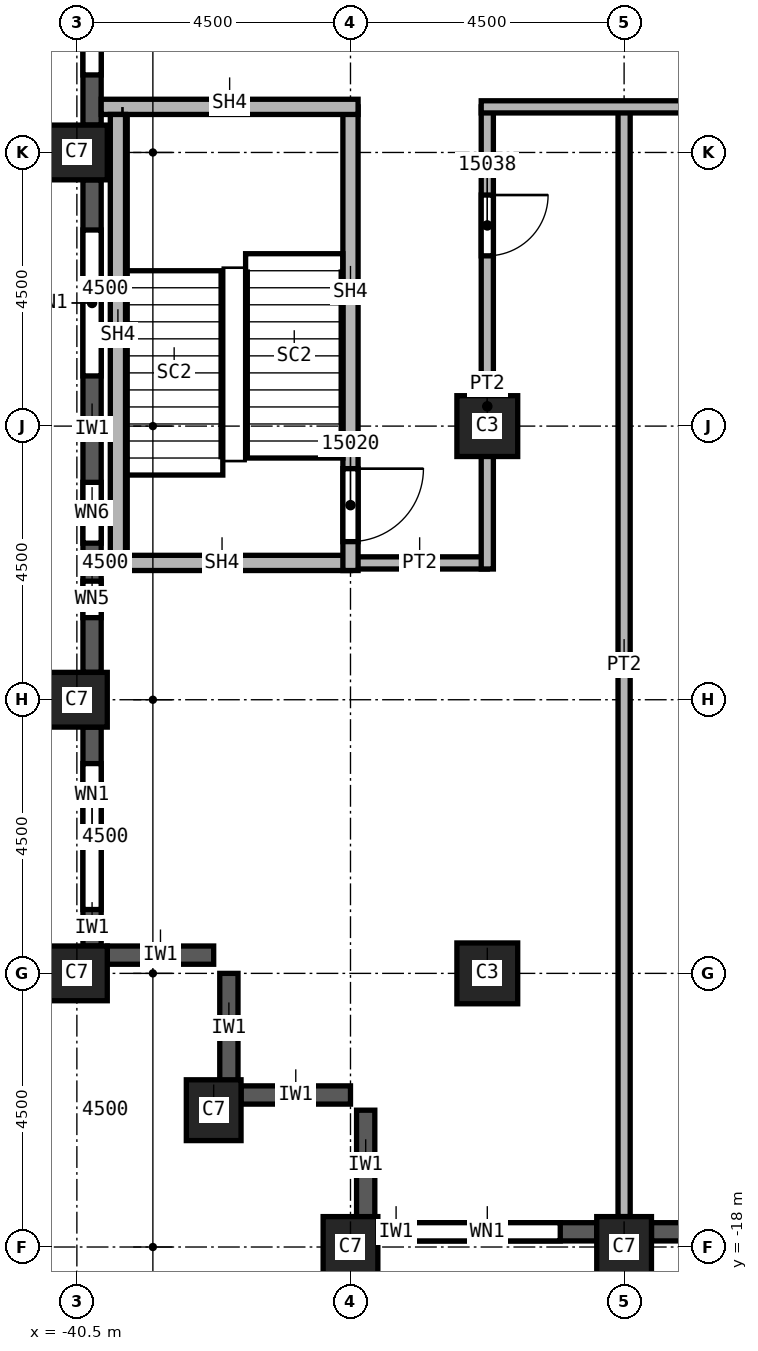
"""IFC4 building model, lengths in metres.
Left out: names, types, materials, properties, quantities, classifications, styles, units other than length and angle.
Written with IfcOpenShell. Run it as: python <this file> out.ifc"""

import sys

from ifc_helpers import new_model, si_unit, direction, frame, frame_2d, origin, origin_2d, place, context, subcontext, project, spatial, rectangle, extrude, element, fill, save


model = new_model("IFC4")
c1 = context("Model", 3, precision=1e-05, world=origin(), true_north=direction((0.0, 1.0)))
c2 = subcontext(c1, "Body", "Model", "MODEL_VIEW")
j1 = project(units=[si_unit("LENGTHUNIT", "METRE"), si_unit("PLANEANGLEUNIT", "RADIAN")], contexts=[c1])
p1 = place(None, origin())
s1 = spatial("IfcSite", under=j1, at=p1, CompositionType="ELEMENT")
p2 = place(p1, origin())
s2 = spatial("IfcBuilding", under=s1, at=p2, CompositionType="ELEMENT")
p3 = place(p2, frame((0.0, 0.0, 228.0)))
s3 = spatial("IfcBuildingStorey", under=s2, at=p3, CompositionType="ELEMENT", Elevation=228.0)
for number, where, z_axis, x_axis in (
    (1, (-40.5, 0.0, 0.0), (0.0, 0.0, 1.0), (0.0, 1.0, 0.0)),
    (2, (-40.5, -9.0, 0.0), (0.0, 0.0, 1.0), (0.0, 1.0, 0.0)),
    (3, (-40.5, -13.5, 0.0), (0.0, 0.0, 1.0), (0.0, 1.0, 0.0)),
    (4, (-38.25, -15.75, 0.0), (0.0, 0.0, 1.0), (1.0, 0.0, 0.0)),
    (5, (-31.5, -18.0, 0.0), (0.0, 0.0, 1.0), (1.0, 0.0, 0.0)),
    (6, (-36.0, -18.0, 0.0), (0.0, 0.0, 1.0), (1.0, 0.0, 0.0)),
):
    element("IfcColumn", number, at=place(p3, frame(where, z_axis=z_axis, x_axis=x_axis)), inside=s3, PredefinedType="COLUMN", context=c2, shape_type="SweptSolid", body=[
        extrude(rectangle(XDim=0.9, YDim=1.0, at=origin_2d()), origin(), (0.0, 0.0, 1.0), 3.72),
    ])
for number, where, z_axis, x_axis in (
    (7, (-33.75, -4.5, 0.0), (0.0, 0.0, 1.0), (1.0, 0.0, 0.0)),
    (8, (-33.75, -13.5, 0.0), (0.0, 0.0, 1.0), (1.0, 0.0, 0.0)),
):
    element("IfcColumn", number, at=place(p3, frame(where, z_axis=z_axis, x_axis=x_axis)), inside=s3, PredefinedType="COLUMN", context=c2, shape_type="SweptSolid", body=[
        extrude(rectangle(XDim=1.0, YDim=1.0, at=origin_2d()), origin(), (0.0, 0.0, 1.0), 3.72),
    ])
p4 = place(p3, frame((-40.0, -13.2, 0.0), z_axis=(0.0, 0.0, 1.0), x_axis=(1.0, 0.0, 0.0)))
e9 = element("IfcWall", 9, at=p4, inside=s3, PredefinedType="SOLIDWALL", context=c2, shape_type="SweptSolid", body=[
    extrude(rectangle(XDim=1.75, YDim=0.3, at=frame_2d((0.875, 0.0))), origin(), (0.0, 0.0, 1.0), 3.12),
])
for number, where, z_axis, x_axis in (
    (10, (-38.0, -15.3, 0.0), (0.0, 0.0, 1.0), (0.0, 1.0, 0.0)),
    (11, (-37.8, -15.5, 0.0), (0.0, 0.0, 1.0), (1.0, 0.0, 0.0)),
    (12, (-35.75, -17.55, 0.0), (0.0, 0.0, 1.0), (0.0, 1.0, 0.0)),
):
    element("IfcWall", number, at=place(p3, frame(where, z_axis=z_axis, x_axis=x_axis)), inside=s3, PredefinedType="SOLIDWALL", context=c2, shape_type="SweptSolid", body=[
        extrude(rectangle(XDim=1.8, YDim=0.3, at=frame_2d((0.9, 0.0))), origin(), (0.0, 0.0, 1.0), 3.12),
    ])
p5 = place(p3, frame((-40.25, 8.55, 0.0), z_axis=(0.0, 0.0, 1.0), x_axis=(0.0, -1.0, 0.0)))
e13 = element("IfcWall", 13, at=p5, inside=s3, PredefinedType="SOLIDWALL", context=c2, shape_type="SweptSolid", body=[
    extrude(rectangle(XDim=8.1, YDim=0.3, at=frame_2d((4.05, 0.0))), origin(), (0.0, 0.0, 1.0), 3.12),
])
p6 = place(p5, frame((0.825, 0.0, 0.8)))
e14 = element("IfcOpeningElement", 14, at=p6, cuts=e13, PredefinedType="OPENING", context=c2, shape_type="SweptSolid", body=[
    extrude(rectangle(XDim=2.4, YDim=1.95, at=frame_2d((1.2, 0.975))), frame((0.0, 0.15, 0.0), z_axis=(0.0, -1.0, 0.0), x_axis=(1.0, 0.0, 0.0)), (0.0, 0.0, 1.0), 0.3),
])
p7 = place(p5, frame((4.875, 0.0, 0.8)))
e15 = element("IfcOpeningElement", 15, at=p7, cuts=e13, PredefinedType="OPENING", context=c2, shape_type="SweptSolid", body=[
    extrude(rectangle(XDim=2.4, YDim=1.95, at=frame_2d((1.2, 0.975))), frame((0.0, 0.15, 0.0), z_axis=(0.0, -1.0, 0.0), x_axis=(1.0, 0.0, 0.0)), (0.0, 0.0, 1.0), 0.3),
])
p8 = place(p3, frame((-40.25, -0.45, 0.0), z_axis=(0.0, 0.0, 1.0), x_axis=(0.0, -1.0, 0.0)))
e16 = element("IfcWall", 16, at=p8, inside=s3, PredefinedType="SOLIDWALL", context=c2, shape_type="SweptSolid", body=[
    extrude(rectangle(XDim=8.1, YDim=0.3, at=frame_2d((4.05, 0.0))), origin(), (0.0, 0.0, 1.0), 3.12),
])
p9 = place(p8, frame((0.825, 0.0, 0.8)))
e17 = element("IfcOpeningElement", 17, at=p9, cuts=e16, PredefinedType="OPENING", context=c2, shape_type="SweptSolid", body=[
    extrude(rectangle(XDim=2.4, YDim=1.95, at=frame_2d((1.2, 0.975))), frame((0.0, 0.15, 0.0), z_axis=(0.0, -1.0, 0.0), x_axis=(1.0, 0.0, 0.0)), (0.0, 0.0, 1.0), 0.3),
])
p10 = place(p8, frame((4.975, 0.0, 0.8)))
e18 = element("IfcOpeningElement", 18, at=p10, cuts=e16, PredefinedType="OPENING", context=c2, shape_type="SweptSolid", body=[
    extrude(rectangle(XDim=1.0, YDim=1.95, at=frame_2d((0.5, 0.975))), frame((0.0, 0.15, 0.0), z_axis=(0.0, -1.0, 0.0), x_axis=(1.0, 0.0, 0.0)), (0.0, 0.0, 1.0), 0.3),
])
p11 = place(p8, frame((6.6, 0.0, 0.8)))
e19 = element("IfcOpeningElement", 19, at=p11, cuts=e16, PredefinedType="OPENING", context=c2, shape_type="SweptSolid", body=[
    extrude(rectangle(XDim=0.6, YDim=1.95, at=frame_2d((0.3, 0.975))), frame((0.0, 0.15, 0.0), z_axis=(0.0, -1.0, 0.0), x_axis=(1.0, 0.0, 0.0)), (0.0, 0.0, 1.0), 0.3),
])
p12 = place(p3, frame((-40.25, -9.45, 0.0), z_axis=(0.0, 0.0, 1.0), x_axis=(0.0, -1.0, 0.0)))
e20 = element("IfcWall", 20, at=p12, inside=s3, PredefinedType="SOLIDWALL", context=c2, shape_type="SweptSolid", body=[
    extrude(rectangle(XDim=3.6, YDim=0.3, at=frame_2d((1.8, 0.0))), origin(), (0.0, 0.0, 1.0), 3.12),
])
p13 = place(p12, frame((0.6, 0.0, 0.8)))
e21 = element("IfcOpeningElement", 21, at=p13, cuts=e20, PredefinedType="OPENING", context=c2, shape_type="SweptSolid", body=[
    extrude(rectangle(XDim=2.4, YDim=1.95, at=frame_2d((1.2, 0.975))), frame((0.0, 0.15, 0.0), z_axis=(0.0, -1.0, 0.0), x_axis=(1.0, 0.0, 0.0)), (0.0, 0.0, 1.0), 0.3),
])
p14 = place(p3, frame((-35.55, -17.75, 0.0), z_axis=(0.0, 0.0, 1.0), x_axis=(1.0, 0.0, 0.0)))
e22 = element("IfcWall", 22, at=p14, inside=s3, PredefinedType="SOLIDWALL", context=c2, shape_type="SweptSolid", body=[
    extrude(rectangle(XDim=3.6, YDim=0.3, at=frame_2d((1.8, 0.0))), origin(), (0.0, 0.0, 1.0), 3.12),
])
p15 = place(p14, frame((0.6, 0.0, 0.8)))
e23 = element("IfcOpeningElement", 23, at=p15, cuts=e22, PredefinedType="OPENING", context=c2, shape_type="SweptSolid", body=[
    extrude(rectangle(XDim=2.4, YDim=1.95, at=frame_2d((1.2, 0.975))), frame((0.0, 0.15, 0.0), z_axis=(0.0, -1.0, 0.0), x_axis=(1.0, 0.0, 0.0)), (0.0, 0.0, 1.0), 0.3),
])
p16 = place(p3, frame((-31.05, -17.75, 0.0), z_axis=(0.0, 0.0, 1.0), x_axis=(1.0, 0.0, 0.0)))
e24 = element("IfcWall", 24, at=p16, inside=s3, PredefinedType="SOLIDWALL", context=c2, shape_type="SweptSolid", body=[
    extrude(rectangle(XDim=3.6, YDim=0.3, at=frame_2d((1.8, 0.0))), origin(), (0.0, 0.0, 1.0), 3.12),
])
p17 = place(p16, frame((0.6, 0.0, 0.8)))
e25 = element("IfcOpeningElement", 25, at=p17, cuts=e24, PredefinedType="OPENING", context=c2, shape_type="SweptSolid", body=[
    extrude(rectangle(XDim=2.4, YDim=1.95, at=frame_2d((1.2, 0.975))), frame((0.0, 0.15, 0.0), z_axis=(0.0, -1.0, 0.0), x_axis=(1.0, 0.0, 0.0)), (0.0, 0.0, 1.0), 0.3),
])
p18 = place(p3, frame((-33.75, -6.75, 0.0), z_axis=(0.0, 0.0, 1.0), x_axis=(-1.0, 0.0, 0.0)))
e26 = element("IfcWall", 26, at=p18, inside=s3, PredefinedType="PARTITIONING", context=c2, shape_type="SweptSolid", body=[
    extrude(rectangle(XDim=2.25, YDim=0.2, at=frame_2d((1.125, 0.0))), origin(), (0.0, 0.0, 1.0), 3.72),
])
p19 = place(p3, frame((-33.75, 0.75, 0.0), z_axis=(0.0, 0.0, 1.0), x_axis=(0.0, -1.0, 0.0)))
e27 = element("IfcWall", 27, at=p19, inside=s3, PredefinedType="PARTITIONING", context=c2, shape_type="SweptSolid", body=[
    extrude(rectangle(XDim=7.6, YDim=0.2, at=frame_2d((3.8, 0.0))), origin(), (0.0, 0.0, 1.0), 3.72),
])
p20 = place(p19, frame((1.45, 0.0, 0.0)))
e28 = element("IfcOpeningElement", 28, at=p20, cuts=e27, PredefinedType="OPENING", context=c2, shape_type="SweptSolid", body=[
    extrude(rectangle(XDim=1.0, YDim=2.1, at=frame_2d((0.5, 1.05))), frame((0.0, 0.1, 0.0), z_axis=(0.0, -1.0, 0.0), x_axis=(1.0, 0.0, 0.0)), (0.0, 0.0, 1.0), 0.2),
])
p21 = place(p3, frame((-31.5, 0.75, 0.0), z_axis=(0.0, 0.0, 1.0), x_axis=(0.0, -1.0, 0.0)))
e29 = element("IfcWall", 29, at=p21, inside=s3, PredefinedType="PARTITIONING", context=c2, shape_type="SweptSolid", body=[
    extrude(rectangle(XDim=18.25, YDim=0.2, at=frame_2d((9.125, 0.0))), origin(), (0.0, 0.0, 1.0), 3.72),
])
p22 = place(p3, frame((-15.4, 0.75, 0.0), z_axis=(0.0, 0.0, 1.0), x_axis=(-1.0, 0.0, 0.0)))
e30 = element("IfcWall", 30, at=p22, inside=s3, PredefinedType="PARTITIONING", context=c2, shape_type="SweptSolid", body=[
    extrude(rectangle(XDim=18.45, YDim=0.2, at=frame_2d((9.225, 0.0))), origin(), (0.0, 0.0, 1.0), 3.72),
])
p23 = place(p22, frame((5.35, 0.0, 0.0)))
e31 = element("IfcOpeningElement", 31, at=p23, cuts=e30, PredefinedType="OPENING", context=c2, shape_type="SweptSolid", body=[
    extrude(rectangle(XDim=1.0, YDim=2.1, at=frame_2d((0.5, 1.05))), frame((0.0, 0.1, 0.0), z_axis=(0.0, -1.0, 0.0), x_axis=(1.0, 0.0, 0.0)), (0.0, 0.0, 1.0), 0.2),
])
p24 = place(p22, frame((12.35, 0.0, 0.0)))
e32 = element("IfcOpeningElement", 32, at=p24, cuts=e30, PredefinedType="OPENING", context=c2, shape_type="SweptSolid", body=[
    extrude(rectangle(XDim=1.0, YDim=2.1, at=frame_2d((0.5, 1.05))), frame((0.0, 0.1, 0.0), z_axis=(0.0, -1.0, 0.0), x_axis=(1.0, 0.0, 0.0)), (0.0, 0.0, 1.0), 0.2),
])
p25 = place(p3, frame((-36.0, -6.75, 0.0), z_axis=(0.0, 0.0, 1.0), x_axis=(-1.0, 0.0, 0.0)))
e33 = element("IfcWall", 33, at=p25, inside=s3, PredefinedType="SOLIDWALL", context=c2, shape_type="SweptSolid", body=[
    extrude(rectangle(XDim=4.1, YDim=0.25, at=frame_2d((2.05, 0.0))), origin(), (0.0, 0.0, 1.0), 3.72),
])
p26 = place(p3, frame((-36.0, 0.75, 0.0), z_axis=(0.0, 0.0, 1.0), x_axis=(0.0, -1.0, 0.0)))
e34 = element("IfcWall", 34, at=p26, inside=s3, PredefinedType="SOLIDWALL", context=c2, shape_type="SweptSolid", body=[
    extrude(rectangle(XDim=7.625, YDim=0.25, at=frame_2d((3.812, 0.0))), origin(), (0.0, 0.0, 1.0), 3.72),
])
p27 = place(p26, frame((5.95, 0.0, 0.0)))
e35 = element("IfcOpeningElement", 35, at=p27, cuts=e34, PredefinedType="OPENING", context=c2, shape_type="SweptSolid", body=[
    extrude(rectangle(XDim=1.2, YDim=2.1, at=frame_2d((0.6, 1.05))), frame((0.0, 0.125, 0.0), z_axis=(0.0, -1.0, 0.0), x_axis=(1.0, 0.0, 0.0)), (0.0, 0.0, 1.0), 0.25),
])
p28 = place(p3, frame((-35.875, 0.75, 0.0), z_axis=(0.0, 0.0, 1.0), x_axis=(-1.0, 0.0, 0.0)))
e36 = element("IfcWall", 36, at=p28, inside=s3, PredefinedType="SOLIDWALL", context=c2, shape_type="SweptSolid", body=[
    extrude(rectangle(XDim=4.225, YDim=0.25, at=frame_2d((2.113, 0.0))), origin(), (0.0, 0.0, 1.0), 3.72),
])
p29 = place(p3, frame((-39.825, -6.625, 0.0), z_axis=(0.0, 0.0, 1.0), x_axis=(0.0, 1.0, 0.0)))
e37 = element("IfcWall", 37, at=p29, inside=s3, PredefinedType="SOLIDWALL", context=c2, shape_type="SweptSolid", body=[
    extrude(rectangle(XDim=7.25, YDim=0.25, at=frame_2d((3.625, 0.0))), origin(), (0.0, 0.0, 1.0), 3.72),
])
p30 = place(p7, origin())
e38 = element("IfcWindow", 38, at=p30, inside=s3, PartitioningType="SINGLE_PANEL", PredefinedType="WINDOW", context=c2, shape_type="SweptSolid", body=[
    extrude(rectangle(XDim=2.4, YDim=1.95, at=frame_2d((1.2, 0.975))), frame((0.0, 0.03, 0.0), z_axis=(0.0, -1.0, 0.0), x_axis=(1.0, 0.0, 0.0)), (0.0, 0.0, 1.0), 0.06),
])
fill(e15, e38)
p31 = place(p9, origin())
e39 = element("IfcWindow", 39, at=p31, inside=s3, PartitioningType="SINGLE_PANEL", PredefinedType="WINDOW", context=c2, shape_type="SweptSolid", body=[
    extrude(rectangle(XDim=2.4, YDim=1.95, at=frame_2d((1.2, 0.975))), frame((0.0, 0.03, 0.0), z_axis=(0.0, -1.0, 0.0), x_axis=(1.0, 0.0, 0.0)), (0.0, 0.0, 1.0), 0.06),
])
fill(e17, e39)
p32 = place(p13, origin())
e40 = element("IfcWindow", 40, at=p32, inside=s3, PartitioningType="SINGLE_PANEL", PredefinedType="WINDOW", context=c2, shape_type="SweptSolid", body=[
    extrude(rectangle(XDim=2.4, YDim=1.95, at=frame_2d((1.2, 0.975))), frame((0.0, 0.03, 0.0), z_axis=(0.0, -1.0, 0.0), x_axis=(1.0, 0.0, 0.0)), (0.0, 0.0, 1.0), 0.06),
])
fill(e21, e40)
p33 = place(p15, origin())
e41 = element("IfcWindow", 41, at=p33, inside=s3, PartitioningType="SINGLE_PANEL", PredefinedType="WINDOW", context=c2, shape_type="SweptSolid", body=[
    extrude(rectangle(XDim=2.4, YDim=1.95, at=frame_2d((1.2, 0.975))), frame((0.0, 0.03, 0.0), z_axis=(0.0, -1.0, 0.0), x_axis=(1.0, 0.0, 0.0)), (0.0, 0.0, 1.0), 0.06),
])
fill(e23, e41)
p34 = place(p27, origin())
e42 = element("IfcDoor", 42, at=p34, inside=s3, OperationType="SINGLE_SWING_LEFT", PredefinedType="DOOR", context=c2, shape_type="SweptSolid", body=[
    extrude(rectangle(XDim=1.2, YDim=2.1, at=frame_2d((0.6, 1.05))), frame((0.0, 0.025, 0.0), z_axis=(0.0, -1.0, 0.0), x_axis=(1.0, 0.0, 0.0)), (0.0, 0.0, 1.0), 0.05),
])
fill(e35, e42)
p35 = place(p20, origin())
e43 = element("IfcDoor", 43, at=p35, inside=s3, OperationType="SINGLE_SWING_LEFT", PredefinedType="DOOR", context=c2, shape_type="SweptSolid", body=[
    extrude(rectangle(XDim=1.0, YDim=2.1, at=frame_2d((0.5, 1.05))), frame((0.0, 0.025, 0.0), z_axis=(0.0, -1.0, 0.0), x_axis=(1.0, 0.0, 0.0)), (0.0, 0.0, 1.0), 0.05),
])
fill(e28, e43)
p36 = place(p10, origin())
e44 = element("IfcWindow", 44, at=p36, inside=s3, PartitioningType="SINGLE_PANEL", PredefinedType="WINDOW", context=c2, shape_type="SweptSolid", body=[
    extrude(rectangle(XDim=1.0, YDim=1.95, at=frame_2d((0.5, 0.975))), frame((0.0, 0.03, 0.0), z_axis=(0.0, -1.0, 0.0), x_axis=(1.0, 0.0, 0.0)), (0.0, 0.0, 1.0), 0.06),
])
fill(e18, e44)
p37 = place(p11, origin())
e45 = element("IfcWindow", 45, at=p37, inside=s3, PartitioningType="SINGLE_PANEL", PredefinedType="WINDOW", context=c2, shape_type="SweptSolid", body=[
    extrude(rectangle(XDim=0.6, YDim=1.95, at=frame_2d((0.3, 0.975))), frame((0.0, 0.03, 0.0), z_axis=(0.0, -1.0, 0.0), x_axis=(1.0, 0.0, 0.0)), (0.0, 0.0, 1.0), 0.06),
])
fill(e19, e45)
save(model, sys.argv[1])
